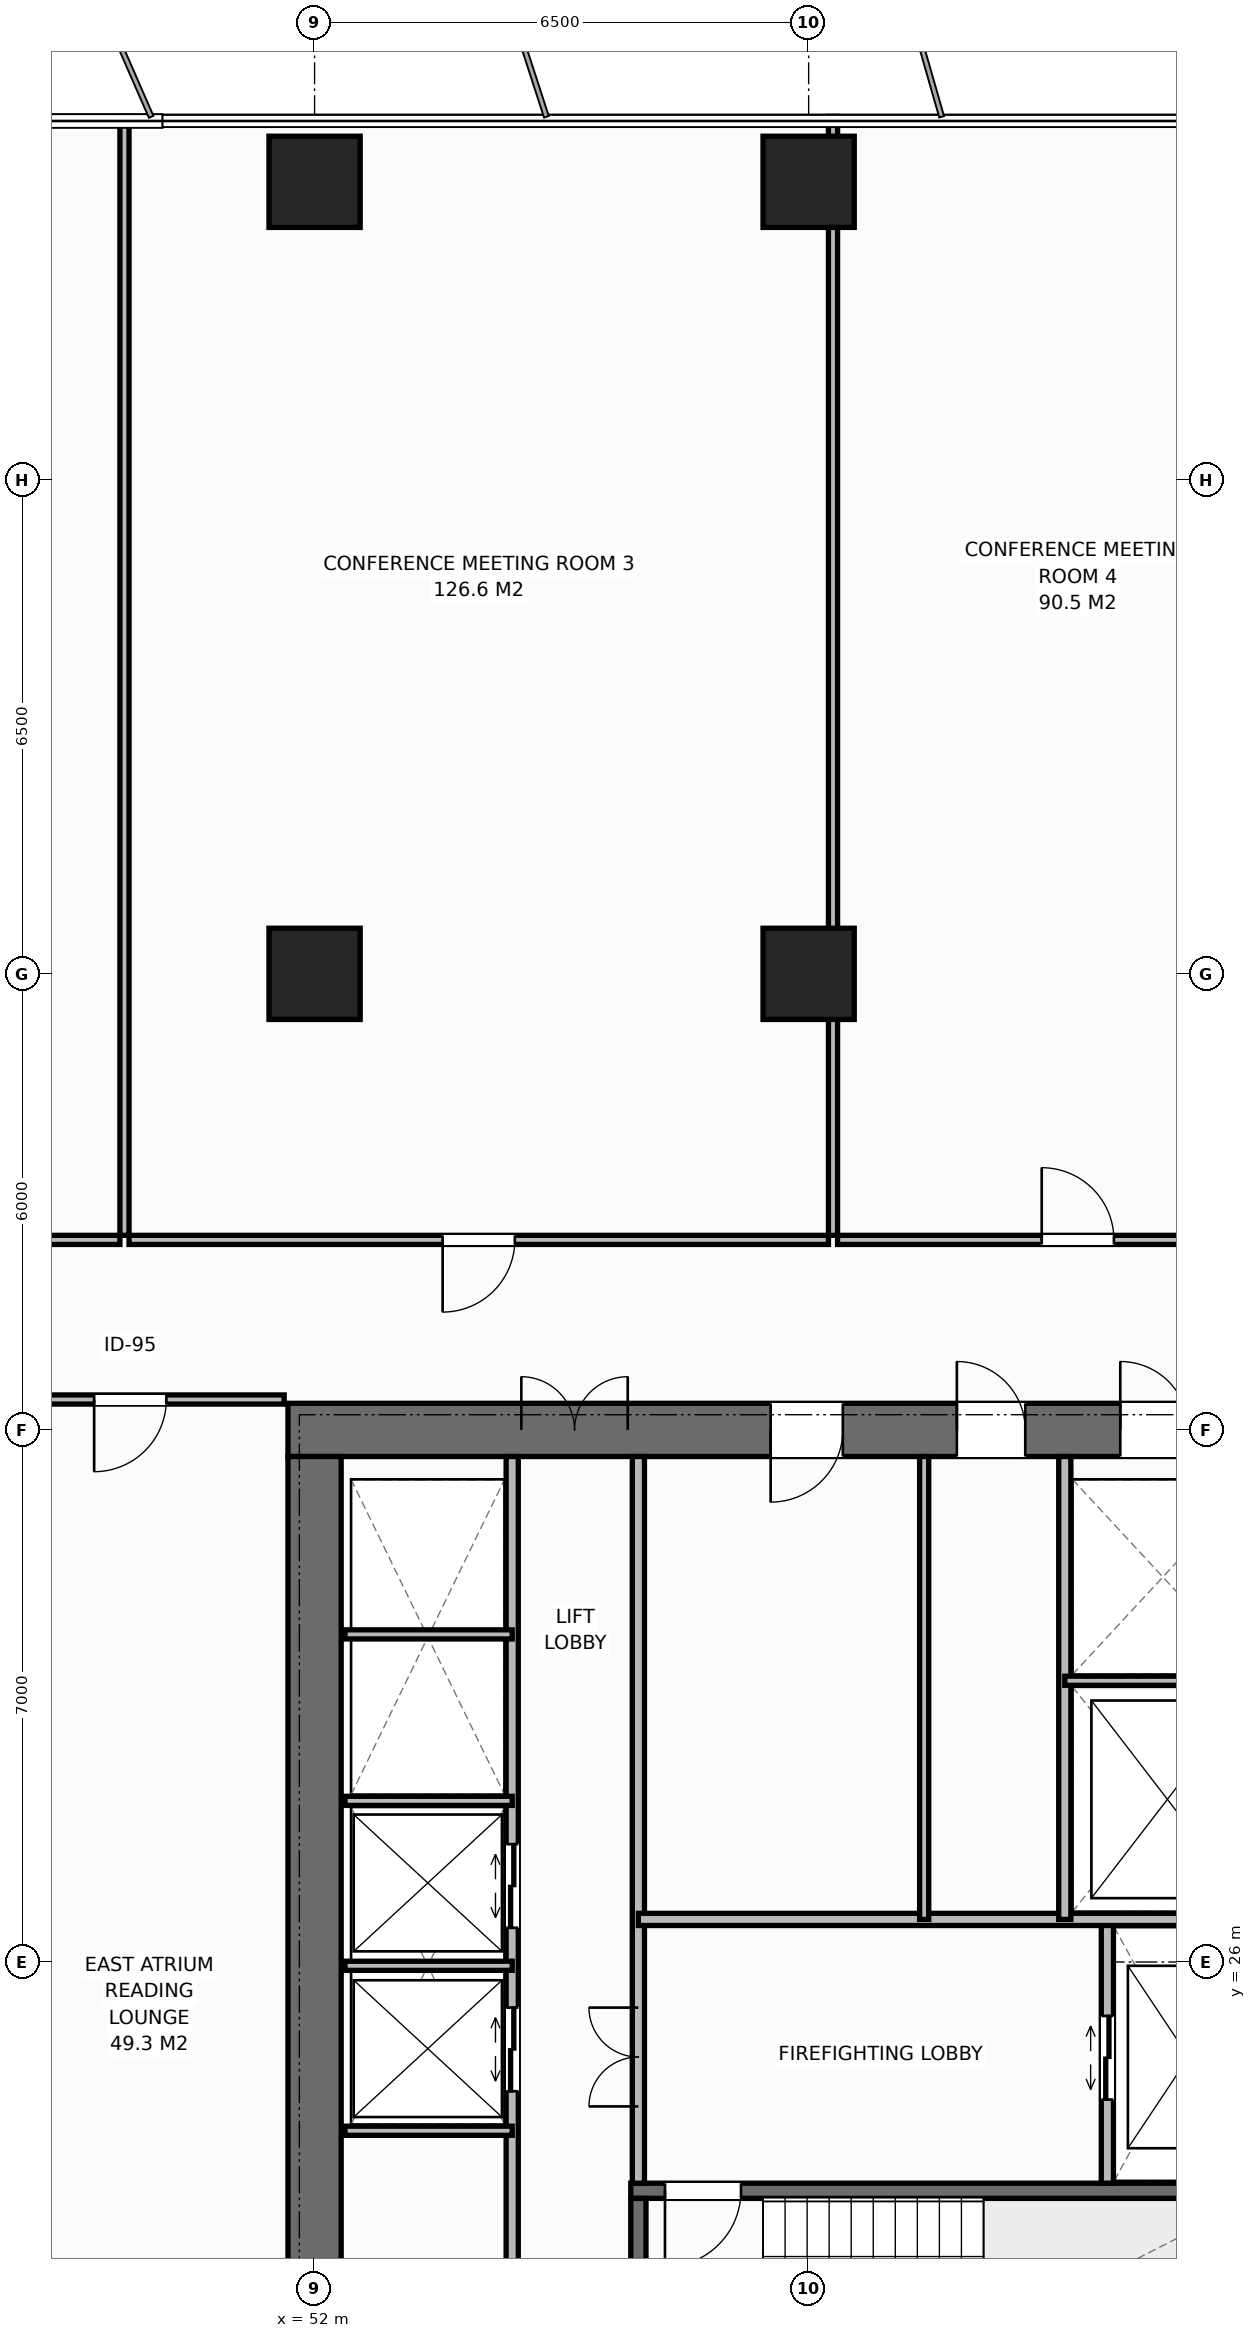
"""IFC4 building model, lengths in metres.
Left out: names, types, materials, properties, quantities, classifications, styles, units other than length and angle.
Written with IfcOpenShell. Run it as: python <this file> out.ifc"""

import sys

from ifc_helpers import new_model, si_unit, direction, frame, frame_2d, origin, origin_2d, place, context, subcontext, project, spatial, rectangle, extrude, element, fill, save


model = new_model("IFC4")
c1 = context("Model", 3, precision=1e-05, world=origin(), true_north=direction((0.0, 1.0)))
c2 = subcontext(c1, "Body", "Model", "MODEL_VIEW")
j1 = project(units=[si_unit("LENGTHUNIT", "METRE"), si_unit("PLANEANGLEUNIT", "RADIAN")], contexts=[c1])
p1 = place(None, origin())
s1 = spatial("IfcSite", under=j1, at=p1, CompositionType="ELEMENT")
p2 = place(p1, origin())
s2 = spatial("IfcBuilding", under=s1, at=p2, CompositionType="ELEMENT")
p3 = place(p2, frame((0.0, 0.0, 120.2)))
s3 = spatial("IfcBuildingStorey", under=s2, at=p3, CompositionType="ELEMENT", Elevation=120.2)
p4 = place(p3, frame((51.65, 33.0, 0.0), z_axis=(0.0, 0.0, 1.0), x_axis=(1.0, 0.0, 0.0)))
e1 = element("IfcWall", 1, at=p4, inside=s3, PredefinedType="SHEAR", context=c2, shape_type="SweptSolid", body=[
    extrude(rectangle(XDim=13.7, YDim=0.7, at=frame_2d((6.85, 0.0))), origin(), (0.0, 0.0, 1.0), 3.8),
])
p5 = place(p4, frame((3.07, 0.0, 0.0)))
e2 = element("IfcOpeningElement", 2, at=p5, cuts=e1, PredefinedType="OPENING", context=c2, shape_type="SweptSolid", body=[
    extrude(rectangle(XDim=1.4, YDim=2.2, at=frame_2d((0.7, 1.1))), frame((0.0, 0.36, 0.0), z_axis=(0.0, -1.0, 0.0), x_axis=(1.0, 0.0, 0.0)), (0.0, 0.0, 1.0), 0.72),
])
p6 = place(p4, frame((10.95, 0.0, 0.0)))
e3 = element("IfcOpeningElement", 3, at=p6, cuts=e1, PredefinedType="OPENING", context=c2, shape_type="SweptSolid", body=[
    extrude(rectangle(XDim=0.9, YDim=2.15, at=frame_2d((0.45, 1.075))), frame((0.0, 0.36, 0.0), z_axis=(0.0, -1.0, 0.0), x_axis=(1.0, 0.0, 0.0)), (0.0, 0.0, 1.0), 0.72),
])
p7 = place(p4, frame((6.35, 0.0, 0.0)))
e4 = element("IfcOpeningElement", 4, at=p7, cuts=e1, PredefinedType="OPENING", context=c2, shape_type="SweptSolid", body=[
    extrude(rectangle(XDim=0.95, YDim=2.15, at=frame_2d((0.475, 1.075))), frame((0.0, 0.36, 0.0), z_axis=(0.0, -1.0, 0.0), x_axis=(1.0, 0.0, 0.0)), (0.0, 0.0, 1.0), 0.72),
])
p8 = place(p4, frame((8.8, 0.0, 0.0)))
e5 = element("IfcOpeningElement", 5, at=p8, cuts=e1, PredefinedType="OPENING", context=c2, shape_type="SweptSolid", body=[
    extrude(rectangle(XDim=0.9, YDim=2.15, at=frame_2d((0.45, 1.075))), frame((0.0, 0.36, 0.0), z_axis=(0.0, -1.0, 0.0), x_axis=(1.0, 0.0, 0.0)), (0.0, 0.0, 1.0), 0.72),
])
p9 = place(p3, frame((52.0, 19.35, 0.0), z_axis=(0.0, 0.0, 1.0), x_axis=(0.0, 1.0, 0.0)))
e6 = element("IfcWall", 6, at=p9, inside=s3, PredefinedType="SHEAR", context=c2, shape_type="SweptSolid", body=[
    extrude(rectangle(XDim=13.3, YDim=0.7, at=frame_2d((6.65, 0.0))), origin(), (0.0, 0.0, 1.0), 3.8),
])
p10 = place(p3, frame((56.16, 22.99, 0.0), z_axis=(0.0, 0.0, 1.0), x_axis=(1.0, 0.0, 0.0)))
e7 = element("IfcWall", 7, at=p10, inside=s3, PredefinedType="SHEAR", context=c2, shape_type="SweptSolid", body=[
    extrude(rectangle(XDim=8.43, YDim=0.2, at=frame_2d((4.215, 0.0))), origin(), (0.0, 0.0, 1.0), 3.8),
])
p11 = place(p10, frame((0.45, 0.0, 0.0)))
e8 = element("IfcOpeningElement", 8, at=p11, cuts=e7, PredefinedType="OPENING", context=c2, shape_type="SweptSolid", body=[
    extrude(rectangle(XDim=1.0, YDim=2.15, at=frame_2d((0.5, 1.075))), frame((0.0, 0.11, 0.0), z_axis=(0.0, -1.0, 0.0), x_axis=(1.0, 0.0, 0.0)), (0.0, 0.0, 1.0), 0.22),
])
p12 = place(p3, frame((56.26, 19.61, 0.0), z_axis=(0.0, 0.0, 1.0), x_axis=(0.0, 1.0, 0.0)))
e9 = element("IfcWall", 9, at=p12, inside=s3, PredefinedType="SHEAR", context=c2, shape_type="SweptSolid", body=[
    extrude(rectangle(XDim=3.28, YDim=0.2, at=frame_2d((1.64, 0.0))), origin(), (0.0, 0.0, 1.0), 3.8),
])
for number, where, z_axis, x_axis in (
    (10, (58.5, 39.0, 0.0), (0.0, 0.0, 1.0), (1.0, 0.0, 0.0)),
    (11, (52.0, 39.0, 0.0), (0.0, 0.0, 1.0), (1.0, 0.0, 0.0)),
    (12, (52.0, 49.42, 0.0), (0.0, 0.0, 1.0), (1.0, 0.0, 0.0)),
    (13, (58.5, 49.42, 0.0), (0.0, 0.0, 1.0), (1.0, 0.0, 0.0)),
):
    element("IfcColumn", number, at=place(p3, frame(where, z_axis=z_axis, x_axis=x_axis)), inside=s3, PredefinedType="COLUMN", context=c2, shape_type="SweptSolid", body=[
        extrude(rectangle(XDim=1.2, YDim=1.2, at=origin_2d()), origin(), (0.0, 0.0, 1.0), 3.8),
    ])
p13 = place(p3, frame((54.6, 19.35, 0.0), z_axis=(0.0, 0.0, 1.0), x_axis=(0.0, 1.0, 0.0)))
e14 = element("IfcWall", 14, at=p13, inside=s3, PredefinedType="STANDARD", context=c2, shape_type="SweptSolid", body=[
    extrude(rectangle(XDim=13.3, YDim=0.16, at=frame_2d((6.65, 0.0))), origin(), (0.0, 0.0, 1.0), 3.565),
])
p14 = place(p13, frame((1.65, 0.0, 0.0)))
e15 = element("IfcOpeningElement", 15, at=p14, cuts=e14, PredefinedType="OPENING", context=c2, shape_type="SweptSolid", body=[
    extrude(rectangle(XDim=0.95, YDim=2.15, at=frame_2d((0.475, 1.075))), frame((0.0, 0.09, 0.0), z_axis=(0.0, -1.0, 0.0), x_axis=(1.0, 0.0, 0.0)), (0.0, 0.0, 1.0), 0.18),
])
p15 = place(p13, frame((4.95, 0.0, 0.0)))
e16 = element("IfcOpeningElement", 16, at=p15, cuts=e14, PredefinedType="OPENING", context=c2, shape_type="SweptSolid", body=[
    extrude(rectangle(XDim=1.1, YDim=2.2, at=frame_2d((0.55, 1.1))), frame((0.0, 0.09, 0.0), z_axis=(0.0, -1.0, 0.0), x_axis=(1.0, 0.0, 0.0)), (0.0, 0.0, 1.0), 0.18),
])
p16 = place(p13, frame((7.1, 0.0, 0.0)))
e17 = element("IfcOpeningElement", 17, at=p16, cuts=e14, PredefinedType="OPENING", context=c2, shape_type="SweptSolid", body=[
    extrude(rectangle(XDim=1.1, YDim=2.2, at=frame_2d((0.55, 1.1))), frame((0.0, 0.09, 0.0), z_axis=(0.0, -1.0, 0.0), x_axis=(1.0, 0.0, 0.0)), (0.0, 0.0, 1.0), 0.18),
])
p17 = place(p3, frame((56.26, 23.09, 0.0), z_axis=(0.0, 0.0, 1.0), x_axis=(0.0, 1.0, 0.0)))
e18 = element("IfcWall", 18, at=p17, inside=s3, PredefinedType="STANDARD", context=c2, shape_type="SweptSolid", body=[
    extrude(rectangle(XDim=9.56, YDim=0.16, at=frame_2d((4.78, 0.0))), origin(), (0.0, 0.0, 1.0), 3.565),
])
p18 = place(p17, frame((1.01, 0.0, 0.0)))
e19 = element("IfcOpeningElement", 19, at=p18, cuts=e18, PredefinedType="OPENING", context=c2, shape_type="SweptSolid", body=[
    extrude(rectangle(XDim=1.3, YDim=2.2, at=frame_2d((0.65, 1.1))), frame((0.0, 0.09, 0.0), z_axis=(0.0, -1.0, 0.0), x_axis=(1.0, 0.0, 0.0)), (0.0, 0.0, 1.0), 0.18),
])
for number, where, z_axis, x_axis in (
    (20, (52.4, 23.78, 0.0), (0.0, 0.0, 1.0), (1.0, 0.0, 0.0)),
    (21, (52.4, 25.95, 0.0), (0.0, 0.0, 1.0), (1.0, 0.0, 0.0)),
    (22, (52.4, 28.12, 0.0), (0.0, 0.0, 1.0), (1.0, 0.0, 0.0)),
    (23, (52.4, 30.31, 0.0), (0.0, 0.0, 1.0), (1.0, 0.0, 0.0)),
):
    element("IfcWall", number, at=place(p3, frame(where, z_axis=z_axis, x_axis=x_axis)), inside=s3, PredefinedType="PARTITIONING", context=c2, shape_type="SweptSolid", body=[
        extrude(rectangle(XDim=2.2, YDim=0.12, at=frame_2d((1.1, 0.0))), origin(), (0.0, 0.0, 1.0), 3.565),
    ])
p19 = place(p3, frame((62.43, 23.09, 0.0), z_axis=(0.0, 0.0, 1.0), x_axis=(0.0, 1.0, 0.0)))
e24 = element("IfcWall", 24, at=p19, inside=s3, PredefinedType="STANDARD", context=c2, shape_type="SweptSolid", body=[
    extrude(rectangle(XDim=3.47, YDim=0.16, at=frame_2d((1.735, 0.0))), origin(), (0.0, 0.0, 1.0), 3.565),
])
p20 = place(p19, frame((1.1, 0.0, 0.0)))
e25 = element("IfcOpeningElement", 25, at=p20, cuts=e24, PredefinedType="OPENING", context=c2, shape_type="SweptSolid", body=[
    extrude(rectangle(XDim=1.1, YDim=2.2, at=frame_2d((0.55, 1.1))), frame((0.0, 0.09, 0.0), z_axis=(0.0, -1.0, 0.0), x_axis=(1.0, 0.0, 0.0)), (0.0, 0.0, 1.0), 0.18),
])
p21 = place(p3, frame((56.26, 26.56, 0.0), z_axis=(0.0, 0.0, 1.0), x_axis=(1.0, 0.0, 0.0)))
e26 = element("IfcWall", 26, at=p21, inside=s3, PredefinedType="STANDARD", context=c2, shape_type="SweptSolid", body=[
    extrude(rectangle(XDim=8.34, YDim=0.16, at=frame_2d((4.17, 0.0))), origin(), (0.0, 0.0, 1.0), 3.565),
])
p22 = place(p3, frame((61.87, 26.56, 0.0), z_axis=(0.0, 0.0, 1.0), x_axis=(0.0, 1.0, 0.0)))
e27 = element("IfcWall", 27, at=p22, inside=s3, PredefinedType="STANDARD", context=c2, shape_type="SweptSolid", body=[
    extrude(rectangle(XDim=6.09, YDim=0.16, at=frame_2d((3.045, 0.0))), origin(), (0.0, 0.0, 1.0), 3.565),
])
p23 = place(p3, frame((61.87, 29.7, 0.0), z_axis=(0.0, 0.0, 1.0), x_axis=(1.0, 0.0, 0.0)))
e28 = element("IfcWall", 28, at=p23, inside=s3, PredefinedType="PARTITIONING", context=c2, shape_type="SweptSolid", body=[
    extrude(rectangle(XDim=2.73, YDim=0.12, at=frame_2d((1.365, 0.0))), origin(), (0.0, 0.0, 1.0), 3.565),
])
p24 = place(p3, frame((60.02, 26.56, 0.0), z_axis=(0.0, 0.0, 1.0), x_axis=(0.0, 1.0, 0.0)))
e29 = element("IfcWall", 29, at=p24, inside=s3, PredefinedType="PARTITIONING", context=c2, shape_type="SweptSolid", body=[
    extrude(rectangle(XDim=6.09, YDim=0.12, at=frame_2d((3.045, 0.0))), origin(), (0.0, 0.0, 1.0), 3.565),
])
p25 = place(p3, frame((48.0, 33.4, 0.0), z_axis=(0.0, 0.0, 1.0), x_axis=(1.0, 0.0, 0.0)))
e30 = element("IfcWall", 30, at=p25, inside=s3, PredefinedType="PARTITIONING", context=c2, shape_type="SweptSolid", body=[
    extrude(rectangle(XDim=3.6, YDim=0.12, at=frame_2d((1.8, 0.0))), origin(), (0.0, 0.0, 1.0), 3.565),
])
p26 = place(p25, frame((1.1, 0.0, 0.0)))
e31 = element("IfcOpeningElement", 31, at=p26, cuts=e30, PredefinedType="OPENING", context=c2, shape_type="SweptSolid", body=[
    extrude(rectangle(XDim=0.95, YDim=2.15, at=frame_2d((0.475, 1.075))), frame((0.0, 0.07, 0.0), z_axis=(0.0, -1.0, 0.0), x_axis=(1.0, 0.0, 0.0)), (0.0, 0.0, 1.0), 0.14),
])
p27 = place(p3, frame((49.499, 35.56, 0.0), z_axis=(0.0, 0.0, 1.0), x_axis=(0.0, 1.0, 0.0)))
e32 = element("IfcWall", 32, at=p27, inside=s3, PredefinedType="PARTITIONING", context=c2, shape_type="SweptSolid", body=[
    extrude(rectangle(XDim=14.72, YDim=0.12, at=frame_2d((7.36, 0.0))), origin(), (0.0, 0.0, 1.0), 3.565),
])
p28 = place(p3, frame((37.357, 35.5, 0.0), z_axis=(0.0, 0.0, 1.0), x_axis=(1.0, 0.0, 0.0)))
e33 = element("IfcWall", 33, at=p28, inside=s3, PredefinedType="PARTITIONING", context=c2, shape_type="SweptSolid", body=[
    extrude(rectangle(XDim=12.082, YDim=0.12, at=frame_2d((6.041, 0.0))), origin(), (0.0, 0.0, 1.0), 3.565),
])
p29 = place(p28, frame((5.566, 0.0, 0.0)))
e34 = element("IfcOpeningElement", 34, at=p29, cuts=e33, PredefinedType="OPENING", context=c2, shape_type="SweptSolid", body=[
    extrude(rectangle(XDim=0.95, YDim=2.15, at=frame_2d((0.475, 1.075))), frame((0.0, 0.07, 0.0), z_axis=(0.0, -1.0, 0.0), x_axis=(1.0, 0.0, 0.0)), (0.0, 0.0, 1.0), 0.14),
])
p30 = place(p3, frame((58.821, 35.56, 0.0), z_axis=(0.0, 0.0, 1.0), x_axis=(0.0, 1.0, 0.0)))
e35 = element("IfcWall", 35, at=p30, inside=s3, PredefinedType="PARTITIONING", context=c2, shape_type="SweptSolid", body=[
    extrude(rectangle(XDim=14.72, YDim=0.12, at=frame_2d((7.36, 0.0))), origin(), (0.0, 0.0, 1.0), 3.565),
])
p31 = place(p3, frame((49.559, 35.5, 0.0), z_axis=(0.0, 0.0, 1.0), x_axis=(1.0, 0.0, 0.0)))
e36 = element("IfcWall", 36, at=p31, inside=s3, PredefinedType="PARTITIONING", context=c2, shape_type="SweptSolid", body=[
    extrude(rectangle(XDim=9.202, YDim=0.12, at=frame_2d((4.601, 0.0))), origin(), (0.0, 0.0, 1.0), 3.565),
])
p32 = place(p31, frame((4.126, 0.0, 0.0)))
e37 = element("IfcOpeningElement", 37, at=p32, cuts=e36, PredefinedType="OPENING", context=c2, shape_type="SweptSolid", body=[
    extrude(rectangle(XDim=0.95, YDim=2.15, at=frame_2d((0.475, 1.075))), frame((0.0, 0.07, 0.0), z_axis=(0.0, -1.0, 0.0), x_axis=(1.0, 0.0, 0.0)), (0.0, 0.0, 1.0), 0.14),
])
p33 = place(p3, frame((58.881, 35.5, 0.0), z_axis=(0.0, 0.0, 1.0), x_axis=(1.0, 0.0, 0.0)))
e38 = element("IfcWall", 38, at=p33, inside=s3, PredefinedType="PARTITIONING", context=c2, shape_type="SweptSolid", body=[
    extrude(rectangle(XDim=6.321, YDim=0.12, at=frame_2d((3.161, 0.0))), origin(), (0.0, 0.0, 1.0), 3.565),
])
p34 = place(p33, frame((2.686, 0.0, 0.0)))
e39 = element("IfcOpeningElement", 39, at=p34, cuts=e38, PredefinedType="OPENING", context=c2, shape_type="SweptSolid", body=[
    extrude(rectangle(XDim=0.95, YDim=2.15, at=frame_2d((0.475, 1.075))), frame((0.0, 0.07, 0.0), z_axis=(0.0, -1.0, 0.0), x_axis=(1.0, 0.0, 0.0)), (0.0, 0.0, 1.0), 0.14),
])
p35 = place(p5, origin())
e40 = element("IfcDoor", 40, at=p35, inside=s3, OperationType="DOUBLE_DOOR_SINGLE_SWING", PredefinedType="DOOR", context=c2, shape_type="SweptSolid", body=[
    extrude(rectangle(XDim=1.4, YDim=2.2, at=frame_2d((0.7, 1.1))), frame((0.0, -0.075, 0.0), z_axis=(0.0, -1.0, 0.0), x_axis=(1.0, 0.0, 0.0)), (0.0, 0.0, 1.0), 0.05),
])
fill(e2, e40)
p36 = place(p15, origin())
e41 = element("IfcDoor", 41, at=p36, inside=s3, OperationType="DOUBLE_DOOR_SLIDING", PredefinedType="DOOR", context=c2, shape_type="SweptSolid", body=[
    extrude(rectangle(XDim=1.1, YDim=2.2, at=frame_2d((0.55, 1.1))), frame((0.0, 0.025, 0.0), z_axis=(0.0, -1.0, 0.0), x_axis=(1.0, 0.0, 0.0)), (0.0, 0.0, 1.0), 0.05),
])
fill(e16, e41)
p37 = place(p16, origin())
e42 = element("IfcDoor", 42, at=p37, inside=s3, OperationType="DOUBLE_DOOR_SLIDING", PredefinedType="DOOR", context=c2, shape_type="SweptSolid", body=[
    extrude(rectangle(XDim=1.1, YDim=2.2, at=frame_2d((0.55, 1.1))), frame((0.0, 0.025, 0.0), z_axis=(0.0, -1.0, 0.0), x_axis=(1.0, 0.0, 0.0)), (0.0, 0.0, 1.0), 0.05),
])
fill(e17, e42)
p38 = place(p11, origin())
e43 = element("IfcDoor", 43, at=p38, inside=s3, OperationType="SINGLE_SWING_RIGHT", PredefinedType="DOOR", context=c2, shape_type="SweptSolid", body=[
    extrude(rectangle(XDim=1.0, YDim=2.15, at=frame_2d((0.5, 1.075))), frame((0.0, 0.025, 0.0), z_axis=(0.0, -1.0, 0.0), x_axis=(1.0, 0.0, 0.0)), (0.0, 0.0, 1.0), 0.05),
])
fill(e8, e43)
p39 = place(p20, origin())
e44 = element("IfcDoor", 44, at=p39, inside=s3, OperationType="DOUBLE_DOOR_SLIDING", PredefinedType="DOOR", context=c2, shape_type="SweptSolid", body=[
    extrude(rectangle(XDim=1.1, YDim=2.2, at=frame_2d((0.55, 1.1))), frame((0.0, 0.025, 0.0), z_axis=(0.0, -1.0, 0.0), x_axis=(1.0, 0.0, 0.0)), (0.0, 0.0, 1.0), 0.05),
])
fill(e25, e44)
p40 = place(p18, origin())
e45 = element("IfcDoor", 45, at=p40, inside=s3, OperationType="DOUBLE_DOOR_SINGLE_SWING", PredefinedType="DOOR", context=c2, shape_type="SweptSolid", body=[
    extrude(rectangle(XDim=1.3, YDim=2.2, at=frame_2d((0.65, 1.1))), frame((0.0, 0.025, 0.0), z_axis=(0.0, -1.0, 0.0), x_axis=(1.0, 0.0, 0.0)), (0.0, 0.0, 1.0), 0.05),
])
fill(e19, e45)
p41 = place(p6, origin())
e46 = element("IfcDoor", 46, at=p41, inside=s3, OperationType="SINGLE_SWING_LEFT", PredefinedType="DOOR", context=c2, shape_type="SweptSolid", body=[
    extrude(rectangle(XDim=0.9, YDim=2.15, at=frame_2d((0.45, 1.075))), frame((0.0, -0.075, 0.0), z_axis=(0.0, -1.0, 0.0), x_axis=(1.0, 0.0, 0.0)), (0.0, 0.0, 1.0), 0.05),
])
fill(e3, e46)
p42 = place(p7, origin())
e47 = element("IfcDoor", 47, at=p42, inside=s3, OperationType="SINGLE_SWING_RIGHT", PredefinedType="DOOR", context=c2, shape_type="SweptSolid", body=[
    extrude(rectangle(XDim=0.95, YDim=2.15, at=frame_2d((0.475, 1.075))), frame((0.0, -0.075, 0.0), z_axis=(0.0, -1.0, 0.0), x_axis=(1.0, 0.0, 0.0)), (0.0, 0.0, 1.0), 0.05),
])
fill(e4, e47)
p43 = place(p8, origin())
e48 = element("IfcDoor", 48, at=p43, inside=s3, OperationType="SINGLE_SWING_LEFT", PredefinedType="DOOR", context=c2, shape_type="SweptSolid", body=[
    extrude(rectangle(XDim=0.9, YDim=2.15, at=frame_2d((0.45, 1.075))), frame((0.0, -0.075, 0.0), z_axis=(0.0, -1.0, 0.0), x_axis=(1.0, 0.0, 0.0)), (0.0, 0.0, 1.0), 0.05),
])
fill(e5, e48)
p44 = place(p26, origin())
e49 = element("IfcDoor", 49, at=p44, inside=s3, OperationType="SINGLE_SWING_RIGHT", PredefinedType="DOOR", context=c2, shape_type="SweptSolid", body=[
    extrude(rectangle(XDim=0.95, YDim=2.15, at=frame_2d((0.475, 1.075))), frame((0.0, 0.025, 0.0), z_axis=(0.0, -1.0, 0.0), x_axis=(1.0, 0.0, 0.0)), (0.0, 0.0, 1.0), 0.05),
])
fill(e31, e49)
p45 = place(p32, origin())
e50 = element("IfcDoor", 50, at=p45, inside=s3, OperationType="SINGLE_SWING_RIGHT", PredefinedType="DOOR", context=c2, shape_type="SweptSolid", body=[
    extrude(rectangle(XDim=0.95, YDim=2.15, at=frame_2d((0.475, 1.075))), frame((0.0, 0.025, 0.0), z_axis=(0.0, -1.0, 0.0), x_axis=(1.0, 0.0, 0.0)), (0.0, 0.0, 1.0), 0.05),
])
fill(e37, e50)
p46 = place(p34, origin())
e51 = element("IfcDoor", 51, at=p46, inside=s3, OperationType="SINGLE_SWING_LEFT", PredefinedType="DOOR", context=c2, shape_type="SweptSolid", body=[
    extrude(rectangle(XDim=0.95, YDim=2.15, at=frame_2d((0.475, 1.075))), frame((0.0, 0.025, 0.0), z_axis=(0.0, -1.0, 0.0), x_axis=(1.0, 0.0, 0.0)), (0.0, 0.0, 1.0), 0.05),
])
fill(e39, e51)
save(model, sys.argv[1])
